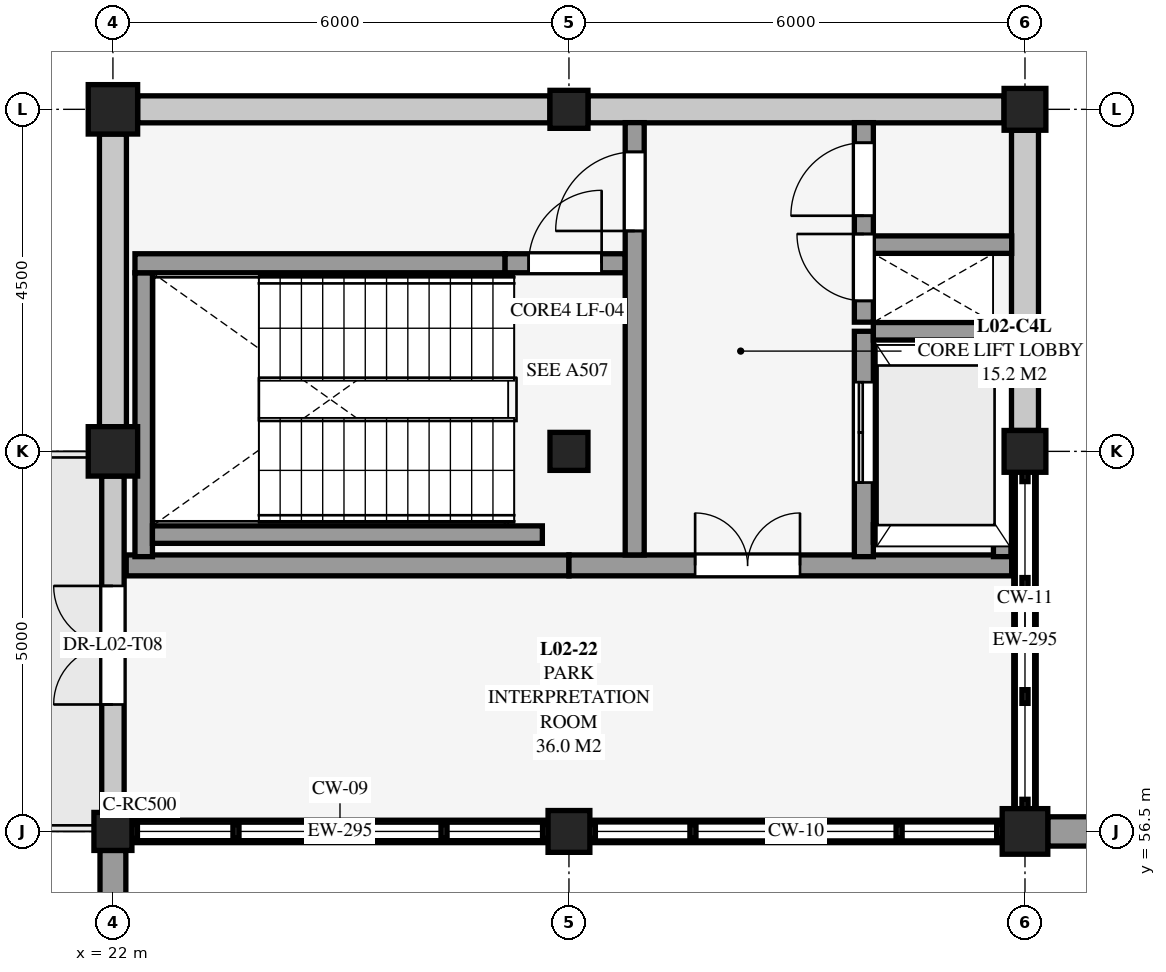
"""IFC4 building model, lengths in metres.
Left out: names, types, materials, properties, quantities, classifications, styles, units other than length and angle.
Written with IfcOpenShell. Run it as: python <this file> out.ifc"""

import sys

from ifc_helpers import new_model, si_unit, direction, frame, frame_2d, origin, origin_2d, place, context, subcontext, project, spatial, rectangle, extrude, element, fill, save


model = new_model("IFC4")
c1 = context("Model", 3, precision=1e-05, world=origin(), true_north=direction((0.0, 1.0)))
c2 = subcontext(c1, "Body", "Model", "MODEL_VIEW")
j1 = project(units=[si_unit("LENGTHUNIT", "METRE"), si_unit("PLANEANGLEUNIT", "RADIAN")], contexts=[c1])
p1 = place(None, origin())
s1 = spatial("IfcSite", under=j1, at=p1, CompositionType="ELEMENT")
p2 = place(p1, origin())
s2 = spatial("IfcBuilding", under=s1, at=p2, CompositionType="ELEMENT")
p3 = place(p2, frame((0.0, 0.0, 4.5)))
s3 = spatial("IfcBuildingStorey", under=s2, at=p3, CompositionType="ELEMENT", Elevation=4.5)
p4 = place(p3, frame((22.0, 56.5, 0.0), z_axis=(0.0, 0.0, 1.0), x_axis=(1.0, 0.0, 0.0)))
e1 = element("IfcColumn", 1, at=p4, inside=s3, PredefinedType="COLUMN", context=c2, shape_type="SweptSolid", body=[
    extrude(rectangle(XDim=0.5, YDim=0.5, at=origin_2d()), origin(), (0.0, 0.0, 1.0), 4.5),
])
for number, where, z_axis, x_axis in (
    (2, (22.0, 61.5, 0.0), (0.0, 0.0, 1.0), (1.0, 0.0, 0.0)),
    (3, (22.0, 66.0, 0.0), (0.0, 0.0, 1.0), (1.0, 0.0, 0.0)),
):
    element("IfcColumn", number, at=place(p3, frame(where, z_axis=z_axis, x_axis=x_axis)), inside=s3, PredefinedType="COLUMN", context=c2, shape_type="SweptSolid", body=[
        extrude(rectangle(XDim=0.65, YDim=0.65, at=origin_2d()), origin(), (0.0, 0.0, 1.0), 4.5),
    ])
p5 = place(p3, frame((28.0, 56.5, 0.0), z_axis=(0.0, 0.0, 1.0), x_axis=(1.0, 0.0, 0.0)))
e4 = element("IfcColumn", 4, at=p5, inside=s3, PredefinedType="COLUMN", context=c2, shape_type="SweptSolid", body=[
    extrude(rectangle(XDim=0.55, YDim=0.55, at=origin_2d()), origin(), (0.0, 0.0, 1.0), 4.5),
])
for number, where, z_axis, x_axis in (
    (5, (28.0, 61.5, 0.0), (0.0, 0.0, 1.0), (1.0, 0.0, 0.0)),
    (6, (28.0, 66.0, 0.0), (0.0, 0.0, 1.0), (1.0, 0.0, 0.0)),
):
    element("IfcColumn", number, at=place(p3, frame(where, z_axis=z_axis, x_axis=x_axis)), inside=s3, PredefinedType="COLUMN", context=c2, shape_type="SweptSolid", body=[
        extrude(rectangle(XDim=0.5, YDim=0.5, at=origin_2d()), origin(), (0.0, 0.0, 1.0), 4.5),
    ])
p6 = place(p3, frame((34.0, 56.5, 0.0), z_axis=(0.0, 0.0, 1.0), x_axis=(1.0, 0.0, 0.0)))
e7 = element("IfcColumn", 7, at=p6, inside=s3, PredefinedType="COLUMN", context=c2, shape_type="SweptSolid", body=[
    extrude(rectangle(XDim=0.6, YDim=0.6, at=origin_2d()), origin(), (0.0, 0.0, 1.0), 4.5),
])
for number, where, z_axis, x_axis in (
    (8, (34.0, 61.5, 0.0), (0.0, 0.0, 1.0), (1.0, 0.0, 0.0)),
    (9, (34.0, 66.0, 0.0), (0.0, 0.0, 1.0), (1.0, 0.0, 0.0)),
):
    element("IfcColumn", number, at=place(p3, frame(where, z_axis=z_axis, x_axis=x_axis)), inside=s3, PredefinedType="COLUMN", context=c2, shape_type="SweptSolid", body=[
        extrude(rectangle(XDim=0.55, YDim=0.55, at=origin_2d()), origin(), (0.0, 0.0, 1.0), 4.5),
    ])
p7 = place(p3, frame((34.3, 56.5, 0.0), z_axis=(0.0, 0.0, 1.0), x_axis=(1.0, 0.0, 0.0)))
e10 = element("IfcWall", 10, at=p7, inside=s3, PredefinedType="USERDEFINED", context=c2, shape_type="SweptSolid", body=[
    extrude(rectangle(XDim=5.45, YDim=0.385, at=frame_2d((2.725, 0.0))), origin(), (0.0, 0.0, 1.0), 4.5),
])
p8 = place(p3, frame((22.0, 51.275, 0.0), z_axis=(0.0, 0.0, 1.0), x_axis=(0.0, 1.0, 0.0)))
e11 = element("IfcWall", 11, at=p8, inside=s3, PredefinedType="USERDEFINED", context=c2, shape_type="SweptSolid", body=[
    extrude(rectangle(XDim=4.975, YDim=0.34, at=frame_2d((2.488, 0.0))), origin(), (0.0, 0.0, 1.0), 4.5),
])
p9 = place(p3, frame((27.725, 56.5, 0.0), z_axis=(0.0, 0.0, 1.0), x_axis=(-1.0, 0.0, 0.0)))
e12 = element("IfcWall", 12, at=p9, inside=s3, PredefinedType="SOLIDWALL", context=c2, shape_type="SweptSolid", body=[
    extrude(rectangle(XDim=5.475, YDim=0.295, at=frame_2d((2.738, 0.0))), origin(), (0.0, 0.0, 1.0), 0.16),
])
p10 = place(p3, frame((22.325, 66.0, 0.0), z_axis=(0.0, 0.0, 1.0), x_axis=(1.0, 0.0, 0.0)))
e13 = element("IfcWall", 13, at=p10, inside=s3, PredefinedType="SOLIDWALL", context=c2, shape_type="SweptSolid", body=[
    extrude(rectangle(XDim=5.425, YDim=0.355, at=frame_2d((2.712, 0.0))), origin(), (0.0, 0.0, 1.0), 3.869),
])
p11 = place(p3, frame((33.7, 56.5, 0.0), z_axis=(0.0, 0.0, 1.0), x_axis=(-1.0, 0.0, 0.0)))
e14 = element("IfcWall", 14, at=p11, inside=s3, PredefinedType="SOLIDWALL", context=c2, shape_type="SweptSolid", body=[
    extrude(rectangle(XDim=5.425, YDim=0.295, at=frame_2d((2.712, 0.0))), origin(), (0.0, 0.0, 1.0), 0.21),
])
p12 = place(p3, frame((28.25, 66.0, 0.0), z_axis=(0.0, 0.0, 1.0), x_axis=(1.0, 0.0, 0.0)))
e15 = element("IfcWall", 15, at=p12, inside=s3, PredefinedType="SOLIDWALL", context=c2, shape_type="SweptSolid", body=[
    extrude(rectangle(XDim=5.475, YDim=0.355, at=frame_2d((2.738, 0.0))), origin(), (0.0, 0.0, 1.0), 3.869),
])
p13 = place(p3, frame((22.0, 56.75, 0.0), z_axis=(0.0, 0.0, 1.0), x_axis=(0.0, 1.0, 0.0)))
e16 = element("IfcWall", 16, at=p13, inside=s3, PredefinedType="SOLIDWALL", context=c2, shape_type="SweptSolid", body=[
    extrude(rectangle(XDim=4.425, YDim=0.295, at=frame_2d((2.212, 0.0))), origin(), (0.0, 0.0, 1.0), 3.743),
])
p14 = place(p13, frame((1.42, 0.0, 0.0)))
e17 = element("IfcOpeningElement", 17, at=p14, cuts=e16, PredefinedType="OPENING", context=c2, shape_type="SweptSolid", body=[
    extrude(rectangle(XDim=1.56, YDim=2.18, at=frame_2d((0.78, 1.09))), frame((0.0, 0.157, 0.0), z_axis=(0.0, -1.0, 0.0), x_axis=(1.0, 0.0, 0.0)), (0.0, 0.0, 1.0), 0.315),
])
p15 = place(p3, frame((34.0, 61.225, 0.0), z_axis=(0.0, 0.0, 1.0), x_axis=(0.0, -1.0, 0.0)))
e18 = element("IfcWall", 18, at=p15, inside=s3, PredefinedType="SOLIDWALL", context=c2, shape_type="SweptSolid", body=[
    extrude(rectangle(XDim=4.425, YDim=0.295, at=frame_2d((2.212, 0.0))), origin(), (0.0, 0.0, 1.0), 0.26),
])
p16 = place(p3, frame((22.0, 61.825, 0.0), z_axis=(0.0, 0.0, 1.0), x_axis=(0.0, 1.0, 0.0)))
e19 = element("IfcWall", 19, at=p16, inside=s3, PredefinedType="SOLIDWALL", context=c2, shape_type="SweptSolid", body=[
    extrude(rectangle(XDim=3.85, YDim=0.355, at=frame_2d((1.925, 0.0))), origin(), (0.0, 0.0, 1.0), 3.869),
])
p17 = place(p3, frame((34.0, 65.725, 0.0), z_axis=(0.0, 0.0, 1.0), x_axis=(0.0, -1.0, 0.0)))
e20 = element("IfcWall", 20, at=p17, inside=s3, PredefinedType="SOLIDWALL", context=c2, shape_type="SweptSolid", body=[
    extrude(rectangle(XDim=3.95, YDim=0.355, at=frame_2d((1.975, 0.0))), origin(), (0.0, 0.0, 1.0), 3.869),
])
p18 = place(p3, frame((22.175, 60.0, 0.0), z_axis=(0.0, 0.0, 1.0), x_axis=(1.0, 0.0, 0.0)))
e21 = element("IfcWall", 21, at=p18, inside=s3, PredefinedType="SHEAR", context=c2, shape_type="SweptSolid", body=[
    extrude(rectangle(XDim=5.825, YDim=0.275, at=frame_2d((2.913, 0.0))), origin(), (0.0, 0.0, 1.0), 4.276),
])
p19 = place(p3, frame((28.0, 60.0, 0.0), z_axis=(0.0, 0.0, 1.0), x_axis=(1.0, 0.0, 0.0)))
e22 = element("IfcWall", 22, at=p19, inside=s3, PredefinedType="SHEAR", context=c2, shape_type="SweptSolid", body=[
    extrude(rectangle(XDim=5.825, YDim=0.275, at=frame_2d((2.913, 0.0))), origin(), (0.0, 0.0, 1.0), 4.276),
])
p20 = place(p19, frame((1.66, 0.0, 0.0)))
e23 = element("IfcOpeningElement", 23, at=p20, cuts=e22, PredefinedType="OPENING", context=c2, shape_type="SweptSolid", body=[
    extrude(rectangle(XDim=1.38, YDim=2.16, at=frame_2d((0.69, 1.08))), frame((0.0, 0.147, 0.0), z_axis=(0.0, -1.0, 0.0), x_axis=(1.0, 0.0, 0.0)), (0.0, 0.0, 1.0), 0.295),
])
p21 = place(p3, frame((22.405, 60.115, 0.0), z_axis=(0.0, 0.0, 1.0), x_axis=(0.0, 1.0, 0.0)))
e24 = element("IfcWall", 24, at=p21, inside=s3, PredefinedType="SHEAR", context=c2, shape_type="SweptSolid", body=[
    extrude(rectangle(XDim=3.735, YDim=0.23, at=frame_2d((1.868, 0.0))), origin(), (0.0, 0.0, 1.0), 4.5),
])
p22 = place(p3, frame((22.52, 60.405, 0.0), z_axis=(0.0, 0.0, 1.0), x_axis=(1.0, 0.0, 0.0)))
e25 = element("IfcWall", 25, at=p22, inside=s3, PredefinedType="SHEAR", context=c2, shape_type="SweptSolid", body=[
    extrude(rectangle(XDim=5.13, YDim=0.23, at=frame_2d((2.565, 0.0))), origin(), (0.0, 0.0, 1.0), 4.5),
])
p23 = place(p3, frame((22.29, 63.975, 0.0), z_axis=(0.0, 0.0, 1.0), x_axis=(1.0, 0.0, 0.0)))
e26 = element("IfcWall", 26, at=p23, inside=s3, PredefinedType="SHEAR", context=c2, shape_type="SweptSolid", body=[
    extrude(rectangle(XDim=4.87, YDim=0.25, at=frame_2d((2.435, 0.0))), origin(), (0.0, 0.0, 1.0), 4.5),
])
p24 = place(p3, frame((27.16, 63.975, 0.0), z_axis=(0.0, 0.0, 1.0), x_axis=(1.0, 0.0, 0.0)))
e27 = element("IfcWall", 27, at=p24, inside=s3, PredefinedType="SHEAR", context=c2, shape_type="SweptSolid", body=[
    extrude(rectangle(XDim=1.58, YDim=0.25, at=frame_2d((0.79, 0.0))), origin(), (0.0, 0.0, 1.0), 4.276),
])
p25 = place(p24, frame((0.31, 0.0, 0.0)))
e28 = element("IfcOpeningElement", 28, at=p25, cuts=e27, PredefinedType="OPENING", context=c2, shape_type="SweptSolid", body=[
    extrude(rectangle(XDim=0.96, YDim=2.12, at=frame_2d((0.48, 1.06))), frame((0.0, 0.135, 0.0), z_axis=(0.0, -1.0, 0.0), x_axis=(1.0, 0.0, 0.0)), (0.0, 0.0, 1.0), 0.27),
])
p26 = place(p3, frame((28.865, 60.137, 0.0), z_axis=(0.0, 0.0, 1.0), x_axis=(0.0, 1.0, 0.0)))
e29 = element("IfcWall", 29, at=p26, inside=s3, PredefinedType="SHEAR", context=c2, shape_type="SweptSolid", body=[
    extrude(rectangle(XDim=5.688, YDim=0.25, at=frame_2d((2.844, 0.0))), origin(), (0.0, 0.0, 1.0), 4.276),
])
p27 = place(p26, frame((4.262, 0.0, 0.0)))
e30 = element("IfcOpeningElement", 30, at=p27, cuts=e29, PredefinedType="OPENING", context=c2, shape_type="SweptSolid", body=[
    extrude(rectangle(XDim=1.04, YDim=2.14, at=frame_2d((0.52, 1.07))), frame((0.0, 0.135, 0.0), z_axis=(0.0, -1.0, 0.0), x_axis=(1.0, 0.0, 0.0)), (0.0, 0.0, 1.0), 0.27),
])
p28 = place(p3, frame((31.88, 60.115, 0.0), z_axis=(0.0, 0.0, 1.0), x_axis=(0.0, 1.0, 0.0)))
e31 = element("IfcWall", 31, at=p28, inside=s3, PredefinedType="SHEAR", context=c2, shape_type="SweptSolid", body=[
    extrude(rectangle(XDim=2.965, YDim=0.25, at=frame_2d((1.482, 0.0))), origin(), (0.0, 0.0, 1.0), 4.5),
])
p29 = place(p28, frame((0.975, 0.0, 0.0)))
e32 = element("IfcOpeningElement", 32, at=p29, cuts=e31, PredefinedType="OPENING", context=c2, shape_type="SweptSolid", body=[
    extrude(rectangle(XDim=1.32, YDim=2.2, at=frame_2d((0.66, 1.1))), frame((0.0, 0.135, 0.0), z_axis=(0.0, -1.0, 0.0), x_axis=(1.0, 0.0, 0.0)), (0.0, 0.0, 1.0), 0.27),
])
p30 = place(p3, frame((32.005, 60.42, 0.0), z_axis=(0.0, 0.0, 1.0), x_axis=(1.0, 0.0, 0.0)))
e33 = element("IfcWall", 33, at=p30, inside=s3, PredefinedType="SHEAR", context=c2, shape_type="SweptSolid", body=[
    extrude(rectangle(XDim=1.58, YDim=0.23, at=frame_2d((0.79, 0.0))), origin(), (0.0, 0.0, 1.0), 4.5),
])
p31 = place(p3, frame((33.7, 60.115, 0.0), z_axis=(0.0, 0.0, 1.0), x_axis=(0.0, 1.0, 0.0)))
e34 = element("IfcWall", 34, at=p31, inside=s3, PredefinedType="SHEAR", context=c2, shape_type="SweptSolid", body=[
    extrude(rectangle(XDim=2.965, YDim=0.23, at=frame_2d((1.482, 0.0))), origin(), (0.0, 0.0, 1.0), 4.5),
])
p32 = place(p3, frame((32.005, 63.08, 0.0), z_axis=(0.0, 0.0, 1.0), x_axis=(1.0, 0.0, 0.0)))
e35 = element("IfcWall", 35, at=p32, inside=s3, PredefinedType="SHEAR", context=c2, shape_type="SweptSolid", body=[
    extrude(rectangle(XDim=1.58, YDim=0.23, at=frame_2d((0.79, 0.0))), origin(), (0.0, 0.0, 1.0), 4.5),
])
p33 = place(p3, frame((31.88, 63.2, 0.0), z_axis=(0.0, 0.0, 1.0), x_axis=(0.0, 1.0, 0.0)))
e36 = element("IfcWall", 36, at=p33, inside=s3, PredefinedType="SHEAR", context=c2, shape_type="SweptSolid", body=[
    extrude(rectangle(XDim=2.625, YDim=0.25, at=frame_2d((1.312, 0.0))), origin(), (0.0, 0.0, 1.0), 4.276),
])
p34 = place(p33, frame((0.28, 0.0, 0.0)))
e37 = element("IfcOpeningElement", 37, at=p34, cuts=e36, PredefinedType="OPENING", context=c2, shape_type="SweptSolid", body=[
    extrude(rectangle(XDim=0.88, YDim=2.08, at=frame_2d((0.44, 1.04))), frame((0.0, 0.135, 0.0), z_axis=(0.0, -1.0, 0.0), x_axis=(1.0, 0.0, 0.0)), (0.0, 0.0, 1.0), 0.27),
])
p35 = place(p33, frame((1.4, 0.0, 0.0)))
e38 = element("IfcOpeningElement", 38, at=p35, cuts=e36, PredefinedType="OPENING", context=c2, shape_type="SweptSolid", body=[
    extrude(rectangle(XDim=0.96, YDim=2.12, at=frame_2d((0.48, 1.06))), frame((0.0, 0.135, 0.0), z_axis=(0.0, -1.0, 0.0), x_axis=(1.0, 0.0, 0.0)), (0.0, 0.0, 1.0), 0.27),
])
p36 = place(p3, frame((32.005, 64.22, 0.0), z_axis=(0.0, 0.0, 1.0), x_axis=(1.0, 0.0, 0.0)))
e39 = element("IfcWall", 39, at=p36, inside=s3, PredefinedType="SHEAR", context=c2, shape_type="SweptSolid", body=[
    extrude(rectangle(XDim=1.82, YDim=0.23, at=frame_2d((0.91, 0.0))), origin(), (0.0, 0.0, 1.0), 4.276),
])
p37 = place(p14, origin())
e40 = element("IfcDoor", 40, at=p37, inside=s3, OperationType="DOUBLE_DOOR_SINGLE_SWING", PredefinedType="DOOR", context=c2, shape_type="SweptSolid", body=[
    extrude(rectangle(XDim=1.56, YDim=2.18, at=frame_2d((0.78, 1.09))), frame((0.0, 0.025, 0.0), z_axis=(0.0, -1.0, 0.0), x_axis=(1.0, 0.0, 0.0)), (0.0, 0.0, 1.0), 0.05),
])
fill(e17, e40)
p38 = place(p20, origin())
e41 = element("IfcDoor", 41, at=p38, inside=s3, OperationType="DOUBLE_DOOR_SINGLE_SWING", PredefinedType="DOOR", context=c2, shape_type="SweptSolid", body=[
    extrude(rectangle(XDim=1.38, YDim=2.16, at=frame_2d((0.69, 1.08))), frame((0.0, 0.025, 0.0), z_axis=(0.0, -1.0, 0.0), x_axis=(1.0, 0.0, 0.0)), (0.0, 0.0, 1.0), 0.05),
])
fill(e23, e41)
p39 = place(p25, origin())
e42 = element("IfcDoor", 42, at=p39, inside=s3, OperationType="SINGLE_SWING_RIGHT", PredefinedType="DOOR", context=c2, shape_type="SweptSolid", body=[
    extrude(rectangle(XDim=0.96, YDim=2.12, at=frame_2d((0.48, 1.06))), frame((0.0, 0.025, 0.0), z_axis=(0.0, -1.0, 0.0), x_axis=(1.0, 0.0, 0.0)), (0.0, 0.0, 1.0), 0.05),
])
fill(e28, e42)
p40 = place(p27, origin())
e43 = element("IfcDoor", 43, at=p40, inside=s3, OperationType="SINGLE_SWING_LEFT", PredefinedType="DOOR", context=c2, shape_type="SweptSolid", body=[
    extrude(rectangle(XDim=1.04, YDim=2.14, at=frame_2d((0.52, 1.07))), frame((0.0, 0.025, 0.0), z_axis=(0.0, -1.0, 0.0), x_axis=(1.0, 0.0, 0.0)), (0.0, 0.0, 1.0), 0.05),
])
fill(e30, e43)
p41 = place(p29, origin())
e44 = element("IfcDoor", 44, at=p41, inside=s3, OperationType="DOUBLE_DOOR_SLIDING", PredefinedType="DOOR", context=c2, shape_type="SweptSolid", body=[
    extrude(rectangle(XDim=1.32, YDim=2.2, at=frame_2d((0.66, 1.1))), frame((0.0, 0.025, 0.0), z_axis=(0.0, -1.0, 0.0), x_axis=(1.0, 0.0, 0.0)), (0.0, 0.0, 1.0), 0.05),
])
fill(e32, e44)
p42 = place(p34, origin())
e45 = element("IfcDoor", 45, at=p42, inside=s3, OperationType="SINGLE_SWING_RIGHT", PredefinedType="DOOR", context=c2, shape_type="SweptSolid", body=[
    extrude(rectangle(XDim=0.88, YDim=2.08, at=frame_2d((0.44, 1.04))), frame((0.0, 0.025, 0.0), z_axis=(0.0, -1.0, 0.0), x_axis=(1.0, 0.0, 0.0)), (0.0, 0.0, 1.0), 0.05),
])
fill(e37, e45)
p43 = place(p35, origin())
e46 = element("IfcDoor", 46, at=p43, inside=s3, OperationType="SINGLE_SWING_LEFT", PredefinedType="DOOR", context=c2, shape_type="SweptSolid", body=[
    extrude(rectangle(XDim=0.96, YDim=2.12, at=frame_2d((0.48, 1.06))), frame((0.0, 0.025, 0.0), z_axis=(0.0, -1.0, 0.0), x_axis=(1.0, 0.0, 0.0)), (0.0, 0.0, 1.0), 0.05),
])
fill(e38, e46)
save(model, sys.argv[1])
